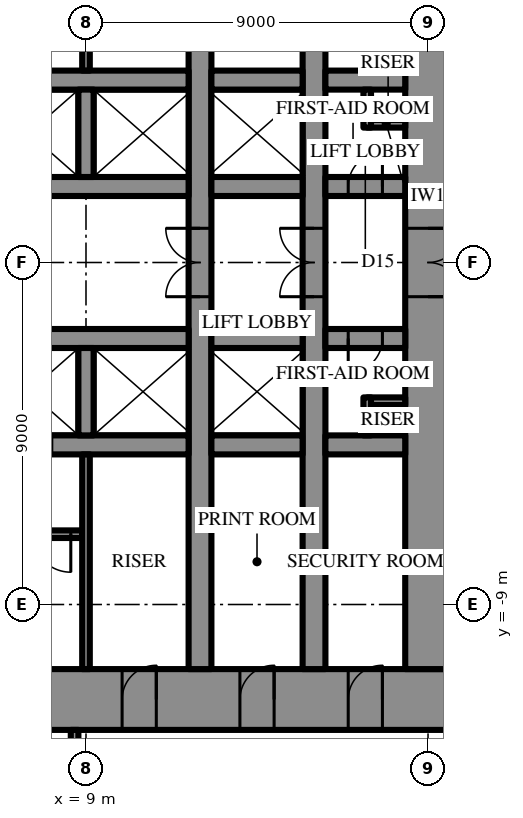
"""IFC4 building model, lengths in metres.
Left out: names, types, materials, properties, quantities, classifications, styles, units other than length and angle.
Written with IfcOpenShell. Run it as: python <this file> out.ifc"""

import sys

from ifc_helpers import new_model, si_unit, direction, frame, frame_2d, origin, place, context, subcontext, project, spatial, rectangle, extrude, element, fill, save


model = new_model("IFC4")
c1 = context("Model", 3, precision=1e-05, world=origin(), true_north=direction((0.0, 1.0)))
c2 = subcontext(c1, "Body", "Model", "MODEL_VIEW")
j1 = project(units=[si_unit("LENGTHUNIT", "METRE"), si_unit("PLANEANGLEUNIT", "RADIAN")], contexts=[c1])
p1 = place(None, origin())
s1 = spatial("IfcSite", under=j1, at=p1, CompositionType="ELEMENT")
p2 = place(p1, origin())
s2 = spatial("IfcBuilding", under=s1, at=p2, CompositionType="ELEMENT")
p3 = place(p2, frame((0.0, 0.0, 136.3)))
s3 = spatial("IfcBuildingStorey", under=s2, at=p3, CompositionType="ELEMENT", Elevation=136.3)
p4 = place(p3, frame((18.6, -11.5, 0.0), z_axis=(0.0, 0.0, 1.0), x_axis=(-1.0, 0.0, 0.0)))
e1 = element("IfcWall", 1, at=p4, inside=s3, PredefinedType="SHEAR", context=c2, shape_type="SweptSolid", body=[
    extrude(rectangle(XDim=37.2, YDim=1.6, at=frame_2d((18.6, 0.0))), origin(), (0.0, 0.0, 1.0), 4.2),
])
p5 = place(p4, frame((19.45, 0.0, 0.0)))
e2 = element("IfcOpeningElement", 2, at=p5, cuts=e1, PredefinedType="OPENING", context=c2, shape_type="SweptSolid", body=[
    extrude(rectangle(XDim=0.9, YDim=2.2, at=frame_2d((0.45, 1.1))), frame((0.0, 0.81, 0.0), z_axis=(0.0, -1.0, 0.0), x_axis=(1.0, 0.0, 0.0)), (0.0, 0.0, 1.0), 1.62),
])
p6 = place(p4, frame((22.45, 0.0, 0.0)))
e3 = element("IfcOpeningElement", 3, at=p6, cuts=e1, PredefinedType="OPENING", context=c2, shape_type="SweptSolid", body=[
    extrude(rectangle(XDim=0.9, YDim=2.2, at=frame_2d((0.45, 1.1))), frame((0.0, 0.81, 0.0), z_axis=(0.0, -1.0, 0.0), x_axis=(1.0, 0.0, 0.0)), (0.0, 0.0, 1.0), 1.62),
])
p7 = place(p4, frame((25.5, 0.0, 0.0)))
e4 = element("IfcOpeningElement", 4, at=p7, cuts=e1, PredefinedType="OPENING", context=c2, shape_type="SweptSolid", body=[
    extrude(rectangle(XDim=1.0, YDim=2.2, at=frame_2d((0.5, 1.1))), frame((0.0, 0.81, 0.0), z_axis=(0.0, -1.0, 0.0), x_axis=(1.0, 0.0, 0.0)), (0.0, 0.0, 1.0), 1.62),
])
p8 = place(p4, frame((1.8, 0.0, 0.0)))
e5 = element("IfcOpeningElement", 5, at=p8, cuts=e1, PredefinedType="OPENING", context=c2, shape_type="SweptSolid", body=[
    extrude(rectangle(XDim=0.9, YDim=2.2, at=frame_2d((0.45, 1.1))), frame((0.0, 0.81, 0.0), z_axis=(0.0, -1.0, 0.0), x_axis=(1.0, 0.0, 0.0)), (0.0, 0.0, 1.0), 1.62),
])
p9 = place(p4, frame((4.65, 0.0, 0.0)))
e6 = element("IfcOpeningElement", 6, at=p9, cuts=e1, PredefinedType="OPENING", context=c2, shape_type="SweptSolid", body=[
    extrude(rectangle(XDim=0.9, YDim=2.2, at=frame_2d((0.45, 1.1))), frame((0.0, 0.81, 0.0), z_axis=(0.0, -1.0, 0.0), x_axis=(1.0, 0.0, 0.0)), (0.0, 0.0, 1.0), 1.62),
])
p10 = place(p4, frame((7.75, 0.0, 0.0)))
e7 = element("IfcOpeningElement", 7, at=p10, cuts=e1, PredefinedType="OPENING", context=c2, shape_type="SweptSolid", body=[
    extrude(rectangle(XDim=0.9, YDim=2.2, at=frame_2d((0.45, 1.1))), frame((0.0, 0.81, 0.0), z_axis=(0.0, -1.0, 0.0), x_axis=(1.0, 0.0, 0.0)), (0.0, 0.0, 1.0), 1.62),
])
p11 = place(p4, frame((28.55, 0.0, 0.0)))
e8 = element("IfcOpeningElement", 8, at=p11, cuts=e1, PredefinedType="OPENING", context=c2, shape_type="SweptSolid", body=[
    extrude(rectangle(XDim=0.9, YDim=2.2, at=frame_2d((0.45, 1.1))), frame((0.0, 0.81, 0.0), z_axis=(0.0, -1.0, 0.0), x_axis=(1.0, 0.0, 0.0)), (0.0, 0.0, 1.0), 1.62),
])
p12 = place(p4, frame((31.65, 0.0, 0.0)))
e9 = element("IfcOpeningElement", 9, at=p12, cuts=e1, PredefinedType="OPENING", context=c2, shape_type="SweptSolid", body=[
    extrude(rectangle(XDim=0.9, YDim=2.2, at=frame_2d((0.45, 1.1))), frame((0.0, 0.81, 0.0), z_axis=(0.0, -1.0, 0.0), x_axis=(1.0, 0.0, 0.0)), (0.0, 0.0, 1.0), 1.62),
])
p13 = place(p4, frame((34.5, 0.0, 0.0)))
e10 = element("IfcOpeningElement", 10, at=p13, cuts=e1, PredefinedType="OPENING", context=c2, shape_type="SweptSolid", body=[
    extrude(rectangle(XDim=0.9, YDim=2.2, at=frame_2d((0.45, 1.1))), frame((0.0, 0.81, 0.0), z_axis=(0.0, -1.0, 0.0), x_axis=(1.0, 0.0, 0.0)), (0.0, 0.0, 1.0), 1.62),
])
p14 = place(p3, frame((18.0, -10.7, 0.0), z_axis=(0.0, 0.0, 1.0), x_axis=(0.0, 1.0, 0.0)))
e11 = element("IfcWall", 11, at=p14, inside=s3, PredefinedType="SHEAR", context=c2, shape_type="SweptSolid", body=[
    extrude(rectangle(XDim=21.4, YDim=1.2, at=frame_2d((10.7, 0.0))), origin(), (0.0, 0.0, 1.0), 4.2),
])
p15 = place(p14, frame((9.8, 0.0, 0.0)))
e12 = element("IfcOpeningElement", 12, at=p15, cuts=e11, PredefinedType="OPENING", context=c2, shape_type="SweptSolid", body=[
    extrude(rectangle(XDim=1.8, YDim=2.4, at=frame_2d((0.9, 1.2))), frame((0.0, 0.61, 0.0), z_axis=(0.0, -1.0, 0.0), x_axis=(1.0, 0.0, 0.0)), (0.0, 0.0, 1.0), 1.22),
])
p16 = place(p3, frame((12.0, -10.7, 0.0), z_axis=(0.0, 0.0, 1.0), x_axis=(0.0, 1.0, 0.0)))
e13 = element("IfcWall", 13, at=p16, inside=s3, PredefinedType="SHEAR", context=c2, shape_type="SweptSolid", body=[
    extrude(rectangle(XDim=21.4, YDim=0.6, at=frame_2d((10.7, 0.0))), origin(), (0.0, 0.0, 1.0), 4.2),
])
p17 = place(p16, frame((9.8, 0.0, 0.0)))
e14 = element("IfcOpeningElement", 14, at=p17, cuts=e13, PredefinedType="OPENING", context=c2, shape_type="SweptSolid", body=[
    extrude(rectangle(XDim=1.8, YDim=2.4, at=frame_2d((0.9, 1.2))), frame((0.0, 0.31, 0.0), z_axis=(0.0, -1.0, 0.0), x_axis=(1.0, 0.0, 0.0)), (0.0, 0.0, 1.0), 0.62),
])
p18 = place(p3, frame((15.0, -10.7, 0.0), z_axis=(0.0, 0.0, 1.0), x_axis=(0.0, 1.0, 0.0)))
e15 = element("IfcWall", 15, at=p18, inside=s3, PredefinedType="SHEAR", context=c2, shape_type="SweptSolid", body=[
    extrude(rectangle(XDim=21.4, YDim=0.6, at=frame_2d((10.7, 0.0))), origin(), (0.0, 0.0, 1.0), 4.2),
])
p19 = place(p18, frame((9.8, 0.0, 0.0)))
e16 = element("IfcOpeningElement", 16, at=p19, cuts=e15, PredefinedType="OPENING", context=c2, shape_type="SweptSolid", body=[
    extrude(rectangle(XDim=1.8, YDim=2.4, at=frame_2d((0.9, 1.2))), frame((0.0, 0.31, 0.0), z_axis=(0.0, -1.0, 0.0), x_axis=(1.0, 0.0, 0.0)), (0.0, 0.0, 1.0), 0.62),
])
p20 = place(p3, frame((-3.2, 2.0, 0.0), z_axis=(0.0, 0.0, 1.0), x_axis=(1.0, 0.0, 0.0)))
e17 = element("IfcWall", 17, at=p20, inside=s3, PredefinedType="SHEAR", context=c2, shape_type="SweptSolid", body=[
    extrude(rectangle(XDim=14.9, YDim=0.5, at=frame_2d((7.45, 0.0))), origin(), (0.0, 0.0, 1.0), 4.2),
])
p21 = place(p20, frame((1.15, 0.0, 0.0)))
e18 = element("IfcOpeningElement", 18, at=p21, cuts=e17, PredefinedType="OPENING", context=c2, shape_type="SweptSolid", body=[
    extrude(rectangle(XDim=1.1, YDim=2.2, at=frame_2d((0.55, 1.1))), frame((0.0, 0.26, 0.0), z_axis=(0.0, -1.0, 0.0), x_axis=(1.0, 0.0, 0.0)), (0.0, 0.0, 1.0), 0.52),
])
p22 = place(p20, frame((4.15, 0.0, 0.0)))
e19 = element("IfcOpeningElement", 19, at=p22, cuts=e17, PredefinedType="OPENING", context=c2, shape_type="SweptSolid", body=[
    extrude(rectangle(XDim=1.1, YDim=2.2, at=frame_2d((0.55, 1.1))), frame((0.0, 0.26, 0.0), z_axis=(0.0, -1.0, 0.0), x_axis=(1.0, 0.0, 0.0)), (0.0, 0.0, 1.0), 0.52),
])
p23 = place(p20, frame((7.15, 0.0, 0.0)))
e20 = element("IfcOpeningElement", 20, at=p23, cuts=e17, PredefinedType="OPENING", context=c2, shape_type="SweptSolid", body=[
    extrude(rectangle(XDim=1.1, YDim=2.2, at=frame_2d((0.55, 1.1))), frame((0.0, 0.26, 0.0), z_axis=(0.0, -1.0, 0.0), x_axis=(1.0, 0.0, 0.0)), (0.0, 0.0, 1.0), 0.52),
])
p24 = place(p20, frame((10.15, 0.0, 0.0)))
e21 = element("IfcOpeningElement", 21, at=p24, cuts=e17, PredefinedType="OPENING", context=c2, shape_type="SweptSolid", body=[
    extrude(rectangle(XDim=1.1, YDim=2.2, at=frame_2d((0.55, 1.1))), frame((0.0, 0.26, 0.0), z_axis=(0.0, -1.0, 0.0), x_axis=(1.0, 0.0, 0.0)), (0.0, 0.0, 1.0), 0.52),
])
p25 = place(p3, frame((12.3, 2.0, 0.0), z_axis=(0.0, 0.0, 1.0), x_axis=(1.0, 0.0, 0.0)))
e22 = element("IfcWall", 22, at=p25, inside=s3, PredefinedType="SHEAR", context=c2, shape_type="SweptSolid", body=[
    extrude(rectangle(XDim=2.4, YDim=0.5, at=frame_2d((1.2, 0.0))), origin(), (0.0, 0.0, 1.0), 4.2),
])
p26 = place(p3, frame((15.3, 2.0, 0.0), z_axis=(0.0, 0.0, 1.0), x_axis=(1.0, 0.0, 0.0)))
e23 = element("IfcWall", 23, at=p26, inside=s3, PredefinedType="SHEAR", context=c2, shape_type="SweptSolid", body=[
    extrude(rectangle(XDim=2.1, YDim=0.5, at=frame_2d((1.05, 0.0))), origin(), (0.0, 0.0, 1.0), 4.2),
])
p27 = place(p26, frame((0.6, 0.0, 0.0)))
e24 = element("IfcOpeningElement", 24, at=p27, cuts=e23, PredefinedType="OPENING", context=c2, shape_type="SweptSolid", body=[
    extrude(rectangle(XDim=0.9, YDim=2.2, at=frame_2d((0.45, 1.1))), frame((0.0, 0.26, 0.0), z_axis=(0.0, -1.0, 0.0), x_axis=(1.0, 0.0, 0.0)), (0.0, 0.0, 1.0), 0.52),
])
p28 = place(p3, frame((-11.7, 4.8, 0.0), z_axis=(0.0, 0.0, 1.0), x_axis=(1.0, 0.0, 0.0)))
e25 = element("IfcWall", 25, at=p28, inside=s3, PredefinedType="SHEAR", context=c2, shape_type="SweptSolid", body=[
    extrude(rectangle(XDim=23.4, YDim=0.5, at=frame_2d((11.7, 0.0))), origin(), (0.0, 0.0, 1.0), 4.2),
])
p29 = place(p28, frame((6.6, 0.0, 0.0)))
e26 = element("IfcOpeningElement", 26, at=p29, cuts=e25, PredefinedType="OPENING", context=c2, shape_type="SweptSolid", body=[
    extrude(rectangle(XDim=1.2, YDim=2.2, at=frame_2d((0.6, 1.1))), frame((0.0, 0.26, 0.0), z_axis=(0.0, -1.0, 0.0), x_axis=(1.0, 0.0, 0.0)), (0.0, 0.0, 1.0), 0.52),
])
p30 = place(p28, frame((3.6, 0.0, 0.0)))
e27 = element("IfcOpeningElement", 27, at=p30, cuts=e25, PredefinedType="OPENING", context=c2, shape_type="SweptSolid", body=[
    extrude(rectangle(XDim=1.2, YDim=2.2, at=frame_2d((0.6, 1.1))), frame((0.0, 0.26, 0.0), z_axis=(0.0, -1.0, 0.0), x_axis=(1.0, 0.0, 0.0)), (0.0, 0.0, 1.0), 0.52),
])
p31 = place(p3, frame((12.3, 4.8, 0.0), z_axis=(0.0, 0.0, 1.0), x_axis=(1.0, 0.0, 0.0)))
e28 = element("IfcWall", 28, at=p31, inside=s3, PredefinedType="SHEAR", context=c2, shape_type="SweptSolid", body=[
    extrude(rectangle(XDim=2.4, YDim=0.5, at=frame_2d((1.2, 0.0))), origin(), (0.0, 0.0, 1.0), 4.2),
])
p32 = place(p3, frame((15.3, 4.8, 0.0), z_axis=(0.0, 0.0, 1.0), x_axis=(1.0, 0.0, 0.0)))
e29 = element("IfcWall", 29, at=p32, inside=s3, PredefinedType="SHEAR", context=c2, shape_type="SweptSolid", body=[
    extrude(rectangle(XDim=2.1, YDim=0.5, at=frame_2d((1.05, 0.0))), origin(), (0.0, 0.0, 1.0), 4.2),
])
p33 = place(p3, frame((9.0, 2.25, 0.0), z_axis=(0.0, 0.0, 1.0), x_axis=(0.0, 1.0, 0.0)))
e30 = element("IfcWall", 30, at=p33, inside=s3, PredefinedType="SHEAR", context=c2, shape_type="SweptSolid", body=[
    extrude(rectangle(XDim=2.3, YDim=0.4, at=frame_2d((1.15, 0.0))), origin(), (0.0, 0.0, 1.0), 4.2),
])
p34 = place(p3, frame((17.4, -2.0, 0.0), z_axis=(0.0, 0.0, 1.0), x_axis=(-1.0, 0.0, 0.0)))
e31 = element("IfcWall", 31, at=p34, inside=s3, PredefinedType="SHEAR", context=c2, shape_type="SweptSolid", body=[
    extrude(rectangle(XDim=2.1, YDim=0.5, at=frame_2d((1.05, 0.0))), origin(), (0.0, 0.0, 1.0), 4.2),
])
p35 = place(p34, frame((0.6, 0.0, 0.0)))
e32 = element("IfcOpeningElement", 32, at=p35, cuts=e31, PredefinedType="OPENING", context=c2, shape_type="SweptSolid", body=[
    extrude(rectangle(XDim=0.9, YDim=2.2, at=frame_2d((0.45, 1.1))), frame((0.0, 0.26, 0.0), z_axis=(0.0, -1.0, 0.0), x_axis=(1.0, 0.0, 0.0)), (0.0, 0.0, 1.0), 0.52),
])
p36 = place(p3, frame((14.7, -2.0, 0.0), z_axis=(0.0, 0.0, 1.0), x_axis=(-1.0, 0.0, 0.0)))
e33 = element("IfcWall", 33, at=p36, inside=s3, PredefinedType="SHEAR", context=c2, shape_type="SweptSolid", body=[
    extrude(rectangle(XDim=2.4, YDim=0.5, at=frame_2d((1.2, 0.0))), origin(), (0.0, 0.0, 1.0), 4.2),
])
p37 = place(p3, frame((11.7, -2.0, 0.0), z_axis=(0.0, 0.0, 1.0), x_axis=(-1.0, 0.0, 0.0)))
e34 = element("IfcWall", 34, at=p37, inside=s3, PredefinedType="SHEAR", context=c2, shape_type="SweptSolid", body=[
    extrude(rectangle(XDim=5.9, YDim=0.5, at=frame_2d((2.95, 0.0))), origin(), (0.0, 0.0, 1.0), 4.2),
])
p38 = place(p3, frame((17.4, -4.8, 0.0), z_axis=(0.0, 0.0, 1.0), x_axis=(-1.0, 0.0, 0.0)))
e35 = element("IfcWall", 35, at=p38, inside=s3, PredefinedType="SHEAR", context=c2, shape_type="SweptSolid", body=[
    extrude(rectangle(XDim=2.1, YDim=0.5, at=frame_2d((1.05, 0.0))), origin(), (0.0, 0.0, 1.0), 4.2),
])
p39 = place(p3, frame((14.7, -4.8, 0.0), z_axis=(0.0, 0.0, 1.0), x_axis=(-1.0, 0.0, 0.0)))
e36 = element("IfcWall", 36, at=p39, inside=s3, PredefinedType="SHEAR", context=c2, shape_type="SweptSolid", body=[
    extrude(rectangle(XDim=2.4, YDim=0.5, at=frame_2d((1.2, 0.0))), origin(), (0.0, 0.0, 1.0), 4.2),
])
p40 = place(p3, frame((11.7, -4.8, 0.0), z_axis=(0.0, 0.0, 1.0), x_axis=(-1.0, 0.0, 0.0)))
e37 = element("IfcWall", 37, at=p40, inside=s3, PredefinedType="SHEAR", context=c2, shape_type="SweptSolid", body=[
    extrude(rectangle(XDim=23.4, YDim=0.5, at=frame_2d((11.7, 0.0))), origin(), (0.0, 0.0, 1.0), 4.2),
])
p41 = place(p40, frame((6.6, 0.0, 0.0)))
e38 = element("IfcOpeningElement", 38, at=p41, cuts=e37, PredefinedType="OPENING", context=c2, shape_type="SweptSolid", body=[
    extrude(rectangle(XDim=1.2, YDim=2.2, at=frame_2d((0.6, 1.1))), frame((0.0, 0.26, 0.0), z_axis=(0.0, -1.0, 0.0), x_axis=(1.0, 0.0, 0.0)), (0.0, 0.0, 1.0), 0.52),
])
p42 = place(p40, frame((3.6, 0.0, 0.0)))
e39 = element("IfcOpeningElement", 39, at=p42, cuts=e37, PredefinedType="OPENING", context=c2, shape_type="SweptSolid", body=[
    extrude(rectangle(XDim=1.2, YDim=2.2, at=frame_2d((0.6, 1.1))), frame((0.0, 0.26, 0.0), z_axis=(0.0, -1.0, 0.0), x_axis=(1.0, 0.0, 0.0)), (0.0, 0.0, 1.0), 0.52),
])
p43 = place(p3, frame((9.0, -2.25, 0.0), z_axis=(0.0, 0.0, 1.0), x_axis=(0.0, -1.0, 0.0)))
e40 = element("IfcWall", 40, at=p43, inside=s3, PredefinedType="SHEAR", context=c2, shape_type="SweptSolid", body=[
    extrude(rectangle(XDim=2.3, YDim=0.4, at=frame_2d((1.15, 0.0))), origin(), (0.0, 0.0, 1.0), 4.2),
])
p44 = place(p3, frame((8.9, -7.15, 0.0), z_axis=(0.0, 0.0, 1.0), x_axis=(-1.0, 0.0, 0.0)))
e41 = element("IfcWall", 41, at=p44, inside=s3, PredefinedType="SHEAR", context=c2, shape_type="SweptSolid", body=[
    extrude(rectangle(XDim=8.6, YDim=0.2, at=frame_2d((4.3, 0.0))), origin(), (0.0, 0.0, 1.0), 4.2),
])
p45 = place(p44, frame((0.3, 0.0, 0.0)))
e42 = element("IfcOpeningElement", 42, at=p45, cuts=e41, PredefinedType="OPENING", context=c2, shape_type="SweptSolid", body=[
    extrude(rectangle(XDim=1.0, YDim=2.2, at=frame_2d((0.5, 1.1))), frame((0.0, 0.11, 0.0), z_axis=(0.0, -1.0, 0.0), x_axis=(1.0, 0.0, 0.0)), (0.0, 0.0, 1.0), 0.22),
])
for number, where, z_axis, x_axis in (
    (43, (9.0, 5.05, 0.0), (0.0, 0.0, 1.0), (0.0, 1.0, 0.0)),
    (44, (9.0, -5.05, 0.0), (0.0, 0.0, 1.0), (0.0, -1.0, 0.0)),
):
    element("IfcWall", number, at=place(p3, frame(where, z_axis=z_axis, x_axis=x_axis)), inside=s3, PredefinedType="PARTITIONING", context=c2, shape_type="SweptSolid", body=[
        extrude(rectangle(XDim=5.65, YDim=0.2, at=frame_2d((2.825, 0.0))), origin(), (0.0, 0.0, 1.0), 4.0),
    ])
for number, where, z_axis, x_axis in (
    (45, (16.4, 3.65, 0.0), (0.0, 0.0, 1.0), (1.0, 0.0, 0.0)),
    (46, (16.4, 3.55, 0.0), (0.0, 0.0, 1.0), (0.0, 1.0, 0.0)),
    (47, (17.4, -3.65, 0.0), (0.0, 0.0, 1.0), (-1.0, 0.0, 0.0)),
    (48, (16.4, -3.55, 0.0), (0.0, 0.0, 1.0), (0.0, -1.0, 0.0)),
):
    element("IfcWall", number, at=place(p3, frame(where, z_axis=z_axis, x_axis=x_axis)), inside=s3, PredefinedType="PARTITIONING", context=c2, shape_type="SweptSolid", body=[
        extrude(rectangle(XDim=1.0, YDim=0.2, at=frame_2d((0.5, 0.0))), origin(), (0.0, 0.0, 1.0), 4.0),
    ])
p46 = place(p3, frame((8.7, -12.3, 0.0), z_axis=(0.0, 0.0, 1.0), x_axis=(0.0, -1.0, 0.0)))
e49 = element("IfcWall", 49, at=p46, inside=s3, PredefinedType="PARTITIONING", context=c2, shape_type="SweptSolid", body=[
    extrude(rectangle(XDim=19.0, YDim=0.2, at=frame_2d((9.5, 0.0))), origin(), (0.0, 0.0, 1.0), 4.0),
])
p47 = place(p46, frame((1.4, 0.0, 0.0)))
e50 = element("IfcOpeningElement", 50, at=p47, cuts=e49, PredefinedType="OPENING", context=c2, shape_type="SweptSolid", body=[
    extrude(rectangle(XDim=1.0, YDim=2.2, at=frame_2d((0.5, 1.1))), frame((0.0, 0.11, 0.0), z_axis=(0.0, -1.0, 0.0), x_axis=(1.0, 0.0, 0.0)), (0.0, 0.0, 1.0), 0.22),
])
p48 = place(p15, frame((1.8, 0.0, 0.0), z_axis=(0.0, 0.0, 1.0), x_axis=(-1.0, 0.0, 0.0)))
e51 = element("IfcDoor", 51, at=p48, inside=s3, OperationType="DOUBLE_DOOR_SINGLE_SWING", PredefinedType="DOOR", context=c2, shape_type="SweptSolid", body=[
    extrude(rectangle(XDim=1.8, YDim=2.4, at=frame_2d((0.9, 1.2))), frame((0.0, 0.025, 0.0), z_axis=(0.0, -1.0, 0.0), x_axis=(1.0, 0.0, 0.0)), (0.0, 0.0, 1.0), 0.05),
])
fill(e12, e51)
p49 = place(p45, origin())
e52 = element("IfcDoor", 52, at=p49, inside=s3, OperationType="SINGLE_SWING_RIGHT", PredefinedType="DOOR", context=c2, shape_type="SweptSolid", body=[
    extrude(rectangle(XDim=1.0, YDim=2.2, at=frame_2d((0.5, 1.1))), frame((0.0, 0.025, 0.0), z_axis=(0.0, -1.0, 0.0), x_axis=(1.0, 0.0, 0.0)), (0.0, 0.0, 1.0), 0.05),
])
fill(e42, e52)
p50 = place(p8, frame((0.9, 0.0, 0.0), z_axis=(0.0, 0.0, 1.0), x_axis=(-1.0, 0.0, 0.0)))
e53 = element("IfcDoor", 53, at=p50, inside=s3, OperationType="SINGLE_SWING_LEFT", PredefinedType="DOOR", context=c2, shape_type="SweptSolid", body=[
    extrude(rectangle(XDim=0.9, YDim=2.2, at=frame_2d((0.45, 1.1))), frame((0.0, 0.025, 0.0), z_axis=(0.0, -1.0, 0.0), x_axis=(1.0, 0.0, 0.0)), (0.0, 0.0, 1.0), 0.05),
])
fill(e5, e53)
p51 = place(p9, frame((0.9, 0.0, 0.0), z_axis=(0.0, 0.0, 1.0), x_axis=(-1.0, 0.0, 0.0)))
e54 = element("IfcDoor", 54, at=p51, inside=s3, OperationType="SINGLE_SWING_LEFT", PredefinedType="DOOR", context=c2, shape_type="SweptSolid", body=[
    extrude(rectangle(XDim=0.9, YDim=2.2, at=frame_2d((0.45, 1.1))), frame((0.0, 0.025, 0.0), z_axis=(0.0, -1.0, 0.0), x_axis=(1.0, 0.0, 0.0)), (0.0, 0.0, 1.0), 0.05),
])
fill(e6, e54)
p52 = place(p10, frame((0.9, 0.0, 0.0), z_axis=(0.0, 0.0, 1.0), x_axis=(-1.0, 0.0, 0.0)))
e55 = element("IfcDoor", 55, at=p52, inside=s3, OperationType="SINGLE_SWING_LEFT", PredefinedType="DOOR", context=c2, shape_type="SweptSolid", body=[
    extrude(rectangle(XDim=0.9, YDim=2.2, at=frame_2d((0.45, 1.1))), frame((0.0, 0.025, 0.0), z_axis=(0.0, -1.0, 0.0), x_axis=(1.0, 0.0, 0.0)), (0.0, 0.0, 1.0), 0.05),
])
fill(e7, e55)
p53 = place(p27, origin())
e56 = element("IfcDoor", 56, at=p53, inside=s3, OperationType="SINGLE_SWING_LEFT", PredefinedType="DOOR", context=c2, shape_type="SweptSolid", body=[
    extrude(rectangle(XDim=0.9, YDim=2.2, at=frame_2d((0.45, 1.1))), frame((0.0, 0.025, 0.0), z_axis=(0.0, -1.0, 0.0), x_axis=(1.0, 0.0, 0.0)), (0.0, 0.0, 1.0), 0.05),
])
fill(e24, e56)
p54 = place(p35, origin())
e57 = element("IfcDoor", 57, at=p54, inside=s3, OperationType="SINGLE_SWING_LEFT", PredefinedType="DOOR", context=c2, shape_type="SweptSolid", body=[
    extrude(rectangle(XDim=0.9, YDim=2.2, at=frame_2d((0.45, 1.1))), frame((0.0, 0.025, 0.0), z_axis=(0.0, -1.0, 0.0), x_axis=(1.0, 0.0, 0.0)), (0.0, 0.0, 1.0), 0.05),
])
fill(e32, e57)
p55 = place(p17, origin())
e58 = element("IfcDoor", 58, at=p55, inside=s3, OperationType="DOUBLE_DOOR_SINGLE_SWING", PredefinedType="DOOR", context=c2, shape_type="SweptSolid", body=[
    extrude(rectangle(XDim=1.8, YDim=2.4, at=frame_2d((0.9, 1.2))), frame((0.0, 0.025, 0.0), z_axis=(0.0, -1.0, 0.0), x_axis=(1.0, 0.0, 0.0)), (0.0, 0.0, 1.0), 0.05),
])
fill(e14, e58)
p56 = place(p19, origin())
e59 = element("IfcDoor", 59, at=p56, inside=s3, OperationType="DOUBLE_DOOR_SINGLE_SWING", PredefinedType="DOOR", context=c2, shape_type="SweptSolid", body=[
    extrude(rectangle(XDim=1.8, YDim=2.4, at=frame_2d((0.9, 1.2))), frame((0.0, 0.025, 0.0), z_axis=(0.0, -1.0, 0.0), x_axis=(1.0, 0.0, 0.0)), (0.0, 0.0, 1.0), 0.05),
])
fill(e16, e59)
save(model, sys.argv[1])
